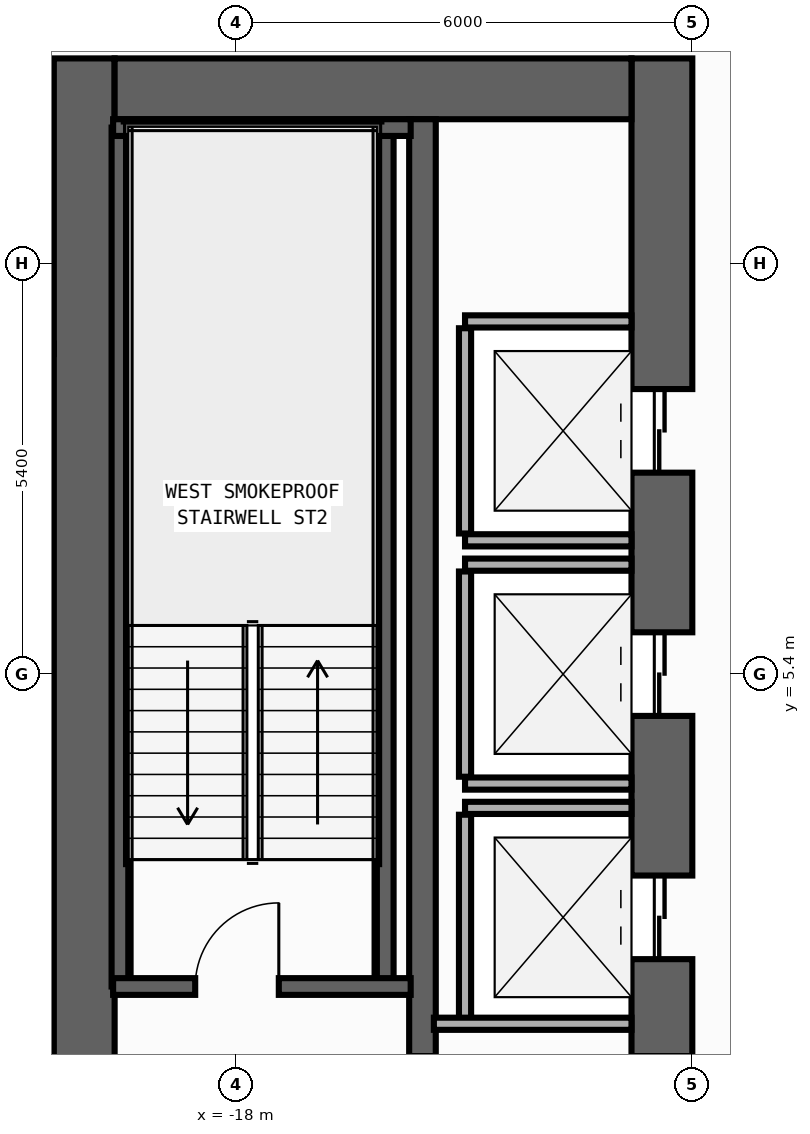
"""IFC4 building model, lengths in metres.
Left out: names, types, materials, properties, quantities, classifications, styles, units other than length and angle.
Written with IfcOpenShell. Run it as: python <this file> out.ifc"""

import sys

from ifc_helpers import new_model, si_unit, direction, frame, frame_2d, origin, place, context, subcontext, project, spatial, rectangle, extrude, element, fill, save


model = new_model("IFC4")
c1 = context("Model", 3, precision=1e-05, world=origin(), true_north=direction((0.0, 1.0)))
c2 = subcontext(c1, "Body", "Model", "MODEL_VIEW")
j1 = project(units=[si_unit("LENGTHUNIT", "METRE"), si_unit("PLANEANGLEUNIT", "RADIAN")], contexts=[c1])
p1 = place(None, origin())
s1 = spatial("IfcSite", under=j1, at=p1, CompositionType="ELEMENT")
p2 = place(p1, origin())
s2 = spatial("IfcBuilding", under=s1, at=p2, CompositionType="ELEMENT")
p3 = place(p2, frame((0.0, 0.0, 93.2)))
s3 = spatial("IfcBuildingStorey", under=s2, at=p3, CompositionType="ELEMENT", Elevation=93.2)
p4 = place(p3, frame((-20.0, -13.5, 0.0), z_axis=(0.0, 0.0, 1.0), x_axis=(0.0, 1.0, 0.0)))
e1 = element("IfcWall", 1, at=p4, inside=s3, PredefinedType="SHEAR", context=c2, shape_type="SweptSolid", body=[
    extrude(rectangle(XDim=27.0, YDim=0.8, at=frame_2d((13.5, 0.0))), origin(), (0.0, 0.0, 1.0), 3.94),
])
p5 = place(p3, frame((-12.4, -13.5, 0.0), z_axis=(0.0, 0.0, 1.0), x_axis=(0.0, 1.0, 0.0)))
e2 = element("IfcWall", 2, at=p5, inside=s3, PredefinedType="SHEAR", context=c2, shape_type="SweptSolid", body=[
    extrude(rectangle(XDim=27.0, YDim=0.8, at=frame_2d((13.5, 0.0))), origin(), (0.0, 0.0, 1.0), 3.94),
])
p6 = place(p5, frame((21.55, 0.0, 0.0)))
e3 = element("IfcOpeningElement", 3, at=p6, cuts=e2, PredefinedType="OPENING", context=c2, shape_type="SweptSolid", body=[
    extrude(rectangle(XDim=1.1, YDim=2.2, at=frame_2d((0.55, 1.1))), frame((0.0, 0.41, 0.0), z_axis=(0.0, -1.0, 0.0), x_axis=(1.0, 0.0, 0.0)), (0.0, 0.0, 1.0), 0.82),
])
p7 = place(p5, frame((18.35, 0.0, 0.0)))
e4 = element("IfcOpeningElement", 4, at=p7, cuts=e2, PredefinedType="OPENING", context=c2, shape_type="SweptSolid", body=[
    extrude(rectangle(XDim=1.1, YDim=2.2, at=frame_2d((0.55, 1.1))), frame((0.0, 0.41, 0.0), z_axis=(0.0, -1.0, 0.0), x_axis=(1.0, 0.0, 0.0)), (0.0, 0.0, 1.0), 0.82),
])
p8 = place(p5, frame((15.15, 0.0, 0.0)))
e5 = element("IfcOpeningElement", 5, at=p8, cuts=e2, PredefinedType="OPENING", context=c2, shape_type="SweptSolid", body=[
    extrude(rectangle(XDim=1.1, YDim=2.2, at=frame_2d((0.55, 1.1))), frame((0.0, 0.41, 0.0), z_axis=(0.0, -1.0, 0.0), x_axis=(1.0, 0.0, 0.0)), (0.0, 0.0, 1.0), 0.82),
])
p9 = place(p5, frame((10.35, 0.0, 0.0)))
e6 = element("IfcOpeningElement", 6, at=p9, cuts=e2, PredefinedType="OPENING", context=c2, shape_type="SweptSolid", body=[
    extrude(rectangle(XDim=1.1, YDim=2.2, at=frame_2d((0.55, 1.1))), frame((0.0, 0.41, 0.0), z_axis=(0.0, -1.0, 0.0), x_axis=(1.0, 0.0, 0.0)), (0.0, 0.0, 1.0), 0.82),
])
p10 = place(p5, frame((7.15, 0.0, 0.0)))
e7 = element("IfcOpeningElement", 7, at=p10, cuts=e2, PredefinedType="OPENING", context=c2, shape_type="SweptSolid", body=[
    extrude(rectangle(XDim=1.1, YDim=2.2, at=frame_2d((0.55, 1.1))), frame((0.0, 0.41, 0.0), z_axis=(0.0, -1.0, 0.0), x_axis=(1.0, 0.0, 0.0)), (0.0, 0.0, 1.0), 0.82),
])
p11 = place(p5, frame((3.95, 0.0, 0.0)))
e8 = element("IfcOpeningElement", 8, at=p11, cuts=e2, PredefinedType="OPENING", context=c2, shape_type="SweptSolid", body=[
    extrude(rectangle(XDim=1.1, YDim=2.2, at=frame_2d((0.55, 1.1))), frame((0.0, 0.41, 0.0), z_axis=(0.0, -1.0, 0.0), x_axis=(1.0, 0.0, 0.0)), (0.0, 0.0, 1.0), 0.82),
])
p12 = place(p5, frame((12.725, 0.0, 0.0)))
e9 = element("IfcOpeningElement", 9, at=p12, cuts=e2, PredefinedType="OPENING", context=c2, shape_type="SweptSolid", body=[
    extrude(rectangle(XDim=1.15, YDim=2.2, at=frame_2d((0.575, 1.1))), frame((0.0, 0.41, 0.0), z_axis=(0.0, -1.0, 0.0), x_axis=(1.0, 0.0, 0.0)), (0.0, 0.0, 1.0), 0.82),
])
p13 = place(p5, frame((1.625, 0.0, 0.0)))
e10 = element("IfcOpeningElement", 10, at=p13, cuts=e2, PredefinedType="OPENING", context=c2, shape_type="SweptSolid", body=[
    extrude(rectangle(XDim=0.85, YDim=2.1, at=frame_2d((0.425, 1.05))), frame((0.0, 0.41, 0.0), z_axis=(0.0, -1.0, 0.0), x_axis=(1.0, 0.0, 0.0)), (0.0, 0.0, 1.0), 0.82),
])
p14 = place(p3, frame((-19.6, 13.1, 0.0), z_axis=(0.0, 0.0, 1.0), x_axis=(1.0, 0.0, 0.0)))
e11 = element("IfcWall", 11, at=p14, inside=s3, PredefinedType="SHEAR", context=c2, shape_type="SweptSolid", body=[
    extrude(rectangle(XDim=6.8, YDim=0.8, at=frame_2d((3.4, 0.0))), origin(), (0.0, 0.0, 1.0), 3.94),
])
p15 = place(p3, frame((-15.55, -12.7, 0.0), z_axis=(0.0, 0.0, 1.0), x_axis=(0.0, 1.0, 0.0)))
e12 = element("IfcWall", 12, at=p15, inside=s3, PredefinedType="SHEAR", context=c2, shape_type="SweptSolid", body=[
    extrude(rectangle(XDim=25.4, YDim=0.35, at=frame_2d((12.7, 0.0))), origin(), (0.0, 0.0, 1.0), 3.94),
])
p16 = place(p15, frame((11.925, 0.0, 0.0)))
e13 = element("IfcOpeningElement", 13, at=p16, cuts=e12, PredefinedType="OPENING", context=c2, shape_type="SweptSolid", body=[
    extrude(rectangle(XDim=1.15, YDim=2.2, at=frame_2d((0.575, 1.1))), frame((0.0, 0.185, 0.0), z_axis=(0.0, -1.0, 0.0), x_axis=(1.0, 0.0, 0.0)), (0.0, 0.0, 1.0), 0.37),
])
p17 = place(p15, frame((0.825, 0.0, 0.0)))
e14 = element("IfcOpeningElement", 14, at=p17, cuts=e12, PredefinedType="OPENING", context=c2, shape_type="SweptSolid", body=[
    extrude(rectangle(XDim=0.85, YDim=2.1, at=frame_2d((0.425, 1.05))), frame((0.0, 0.185, 0.0), z_axis=(0.0, -1.0, 0.0), x_axis=(1.0, 0.0, 0.0)), (0.0, 0.0, 1.0), 0.37),
])
for number, where, z_axis, x_axis in (
    (15, (-16.04, 1.29, 0.0), (0.0, 0.0, 1.0), (0.0, 1.0, 0.0)),
    (16, (-19.53, 1.29, 0.0), (0.0, 0.0, 1.0), (0.0, 1.0, 0.0)),
):
    element("IfcWall", number, at=place(p3, frame(where, z_axis=z_axis, x_axis=x_axis)), inside=s3, PredefinedType="SHEAR", context=c2, shape_type="SweptSolid", body=[
        extrude(rectangle(XDim=11.3, YDim=0.22, at=frame_2d((5.65, 0.0))), origin(), (0.0, 0.0, 1.0), 3.94),
    ])
p18 = place(p3, frame((-19.62, 12.59, 0.0), z_axis=(0.0, 0.0, 1.0), x_axis=(1.0, 0.0, 0.0)))
e17 = element("IfcWall", 17, at=p18, inside=s3, PredefinedType="SHEAR", context=c2, shape_type="SweptSolid", body=[
    extrude(rectangle(XDim=3.915, YDim=0.22, at=frame_2d((1.958, 0.0))), origin(), (0.0, 0.0, 1.0), 3.94),
])
p19 = place(p3, frame((-19.62, 1.29, 0.0), z_axis=(0.0, 0.0, 1.0), x_axis=(1.0, 0.0, 0.0)))
e18 = element("IfcWall", 18, at=p19, inside=s3, PredefinedType="SHEAR", context=c2, shape_type="SweptSolid", body=[
    extrude(rectangle(XDim=3.915, YDim=0.22, at=frame_2d((1.958, 0.0))), origin(), (0.0, 0.0, 1.0), 3.94),
])
p20 = place(p19, frame((1.08, 0.0, 0.0)))
e19 = element("IfcOpeningElement", 19, at=p20, cuts=e18, PredefinedType="OPENING", context=c2, shape_type="SweptSolid", body=[
    extrude(rectangle(XDim=1.1, YDim=2.2, at=frame_2d((0.55, 1.1))), frame((0.0, 0.12, 0.0), z_axis=(0.0, -1.0, 0.0), x_axis=(1.0, 0.0, 0.0)), (0.0, 0.0, 1.0), 0.24),
])
for number, where, z_axis, x_axis in (
    (20, (-14.99, 7.16, 0.0), (0.0, 0.0, 1.0), (1.0, 0.0, 0.0)),
    (21, (-14.99, 10.04, 0.0), (0.0, 0.0, 1.0), (1.0, 0.0, 0.0)),
):
    element("IfcWall", number, at=place(p3, frame(where, z_axis=z_axis, x_axis=x_axis)), inside=s3, PredefinedType="STANDARD", context=c2, shape_type="SweptSolid", body=[
        extrude(rectangle(XDim=2.19, YDim=0.16, at=frame_2d((1.095, 0.0))), origin(), (0.0, 0.0, 1.0), 3.94),
    ])
p21 = place(p3, frame((-14.99, 7.25, 0.0), z_axis=(0.0, 0.0, 1.0), x_axis=(0.0, 1.0, 0.0)))
e22 = element("IfcWall", 22, at=p21, inside=s3, PredefinedType="STANDARD", context=c2, shape_type="SweptSolid", body=[
    extrude(rectangle(XDim=2.7, YDim=0.16, at=frame_2d((1.35, 0.0))), origin(), (0.0, 0.0, 1.0), 3.94),
])
for number, where, z_axis, x_axis in (
    (23, (-14.99, 3.96, 0.0), (0.0, 0.0, 1.0), (1.0, 0.0, 0.0)),
    (24, (-14.99, 6.84, 0.0), (0.0, 0.0, 1.0), (1.0, 0.0, 0.0)),
):
    element("IfcWall", number, at=place(p3, frame(where, z_axis=z_axis, x_axis=x_axis)), inside=s3, PredefinedType="STANDARD", context=c2, shape_type="SweptSolid", body=[
        extrude(rectangle(XDim=2.19, YDim=0.16, at=frame_2d((1.095, 0.0))), origin(), (0.0, 0.0, 1.0), 3.94),
    ])
p22 = place(p3, frame((-14.99, 4.05, 0.0), z_axis=(0.0, 0.0, 1.0), x_axis=(0.0, 1.0, 0.0)))
e25 = element("IfcWall", 25, at=p22, inside=s3, PredefinedType="STANDARD", context=c2, shape_type="SweptSolid", body=[
    extrude(rectangle(XDim=2.7, YDim=0.16, at=frame_2d((1.35, 0.0))), origin(), (0.0, 0.0, 1.0), 3.94),
])
p23 = place(p3, frame((-14.99, 3.64, 0.0), z_axis=(0.0, 0.0, 1.0), x_axis=(1.0, 0.0, 0.0)))
e26 = element("IfcWall", 26, at=p23, inside=s3, PredefinedType="STANDARD", context=c2, shape_type="SweptSolid", body=[
    extrude(rectangle(XDim=2.19, YDim=0.16, at=frame_2d((1.095, 0.0))), origin(), (0.0, 0.0, 1.0), 3.94),
])
p24 = place(p3, frame((-14.99, 0.85, 0.0), z_axis=(0.0, 0.0, 1.0), x_axis=(0.0, 1.0, 0.0)))
e27 = element("IfcWall", 27, at=p24, inside=s3, PredefinedType="STANDARD", context=c2, shape_type="SweptSolid", body=[
    extrude(rectangle(XDim=2.7, YDim=0.16, at=frame_2d((1.35, 0.0))), origin(), (0.0, 0.0, 1.0), 3.94),
])
p25 = place(p3, frame((-15.4, 0.8, 0.0), z_axis=(0.0, 0.0, 1.0), x_axis=(1.0, 0.0, 0.0)))
e28 = element("IfcWall", 28, at=p25, inside=s3, PredefinedType="STANDARD", context=c2, shape_type="SweptSolid", body=[
    extrude(rectangle(XDim=2.6, YDim=0.16, at=frame_2d((1.3, 0.0))), origin(), (0.0, 0.0, 1.0), 3.94),
])
p26 = place(p3, frame((-23.455, 9.68, 0.0), z_axis=(0.0, 0.0, 1.0), x_axis=(1.0, 0.0, 0.0)))
e29 = element("IfcWall", 29, at=p26, inside=s3, PredefinedType="PARTITIONING", context=c2, shape_type="SweptSolid", body=[
    extrude(rectangle(XDim=3.055, YDim=0.14, at=frame_2d((1.528, 0.0))), origin(), (0.0, 0.0, 1.0), 3.94),
])
p27 = place(p20, origin())
e30 = element("IfcDoor", 30, at=p27, inside=s3, OperationType="SINGLE_SWING_RIGHT", PredefinedType="DOOR", context=c2, shape_type="SweptSolid", body=[
    extrude(rectangle(XDim=1.1, YDim=2.2, at=frame_2d((0.55, 1.1))), frame((0.0, 0.025, 0.0), z_axis=(0.0, -1.0, 0.0), x_axis=(1.0, 0.0, 0.0)), (0.0, 0.0, 1.0), 0.05),
])
fill(e19, e30)
p28 = place(p6, origin())
e31 = element("IfcDoor", 31, at=p28, inside=s3, OperationType="DOUBLE_DOOR_SLIDING", PredefinedType="DOOR", context=c2, shape_type="SweptSolid", body=[
    extrude(rectangle(XDim=1.1, YDim=2.2, at=frame_2d((0.55, 1.1))), frame((0.0, 0.025, 0.0), z_axis=(0.0, -1.0, 0.0), x_axis=(1.0, 0.0, 0.0)), (0.0, 0.0, 1.0), 0.05),
])
fill(e3, e31)
p29 = place(p7, origin())
e32 = element("IfcDoor", 32, at=p29, inside=s3, OperationType="DOUBLE_DOOR_SLIDING", PredefinedType="DOOR", context=c2, shape_type="SweptSolid", body=[
    extrude(rectangle(XDim=1.1, YDim=2.2, at=frame_2d((0.55, 1.1))), frame((0.0, 0.025, 0.0), z_axis=(0.0, -1.0, 0.0), x_axis=(1.0, 0.0, 0.0)), (0.0, 0.0, 1.0), 0.05),
])
fill(e4, e32)
p30 = place(p8, origin())
e33 = element("IfcDoor", 33, at=p30, inside=s3, OperationType="DOUBLE_DOOR_SLIDING", PredefinedType="DOOR", context=c2, shape_type="SweptSolid", body=[
    extrude(rectangle(XDim=1.1, YDim=2.2, at=frame_2d((0.55, 1.1))), frame((0.0, 0.025, 0.0), z_axis=(0.0, -1.0, 0.0), x_axis=(1.0, 0.0, 0.0)), (0.0, 0.0, 1.0), 0.05),
])
fill(e5, e33)
save(model, sys.argv[1])
